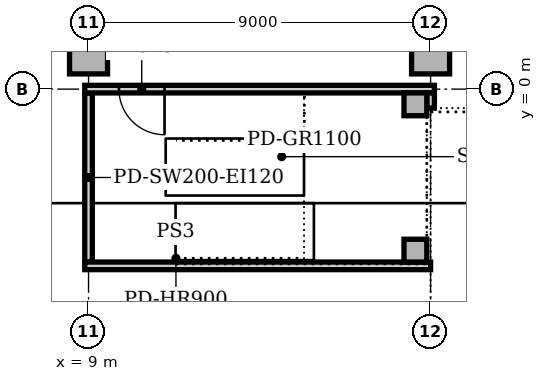
"""IFC4 building model, lengths in metres.
Left out: names, types, materials, properties, quantities, classifications, styles, units other than length and angle.
Written with IfcOpenShell. Run it as: python <this file> out.ifc"""

import sys

from ifc_helpers import new_model, si_unit, direction, frame, frame_2d, origin, origin_2d, place, context, subcontext, project, spatial, rectangle, extrude, element, fill, save


model = new_model("IFC4")
c1 = context("Model", 3, precision=1e-05, world=origin(), true_north=direction((0.0, 1.0)))
c2 = subcontext(c1, "Body", "Model", "MODEL_VIEW")
j1 = project(units=[si_unit("LENGTHUNIT", "METRE"), si_unit("PLANEANGLEUNIT", "RADIAN")], contexts=[c1])
p1 = place(None, origin())
s1 = spatial("IfcSite", under=j1, at=p1, CompositionType="ELEMENT")
p2 = place(p1, origin())
s2 = spatial("IfcBuilding", under=s1, at=p2, CompositionType="ELEMENT")
p3 = place(p2, frame((0.0, 0.0, -14.0)))
s3 = spatial("IfcBuildingStorey", under=s2, at=p3, CompositionType="ELEMENT", Elevation=-14.0)
for number, where, z_axis, x_axis in (
    (1, (9.0, 0.9, 0.0), (0.0, 0.0, 1.0), (1.0, 0.0, 0.0)),
    (2, (18.0, 0.9, 0.0), (0.0, 0.0, 1.0), (1.0, 0.0, 0.0)),
):
    element("IfcColumn", number, at=place(p3, frame(where, z_axis=z_axis, x_axis=x_axis)), inside=s3, PredefinedType="COLUMN", context=c2, shape_type="SweptSolid", body=[
        extrude(rectangle(XDim=1.0, YDim=1.0, at=origin_2d()), origin(), (0.0, 0.0, 1.0), 4.15),
    ])
for number, where, z_axis, x_axis in (
    (3, (17.6, -4.25, 0.0), (0.0, 0.0, 1.0), (1.0, 0.0, 0.0)),
    (4, (17.6, -0.4, 0.0), (0.0, 0.0, 1.0), (1.0, 0.0, 0.0)),
):
    element("IfcColumn", number, at=place(p3, frame(where, z_axis=z_axis, x_axis=x_axis)), inside=s3, PredefinedType="COLUMN", context=c2, shape_type="SweptSolid", body=[
        extrude(rectangle(XDim=0.6, YDim=0.6, at=origin_2d()), origin(), (0.0, 0.0, 1.0), 4.5),
    ])
p4 = place(p3, frame((9.0, -4.55, 0.0), z_axis=(0.0, 0.0, 1.0), x_axis=(0.0, 1.0, 0.0)))
e5 = element("IfcWall", 5, at=p4, inside=s3, PredefinedType="SOLIDWALL", context=c2, shape_type="SweptSolid", body=[
    extrude(rectangle(XDim=4.45, YDim=0.2, at=frame_2d((2.225, 0.0))), origin(), (0.0, 0.0, 1.0), 4.15),
])
p5 = place(p3, frame((8.9, 0.0, 0.0), z_axis=(0.0, 0.0, 1.0), x_axis=(1.0, 0.0, 0.0)))
e6 = element("IfcWall", 6, at=p5, inside=s3, PredefinedType="SOLIDWALL", context=c2, shape_type="SweptSolid", body=[
    extrude(rectangle(XDim=9.2, YDim=0.2, at=frame_2d((4.6, 0.0))), origin(), (0.0, 0.0, 1.0), 4.15),
])
p6 = place(p5, frame((0.9, 0.0, 0.0)))
e7 = element("IfcOpeningElement", 7, at=p6, cuts=e6, PredefinedType="OPENING", context=c2, shape_type="SweptSolid", body=[
    extrude(rectangle(XDim=1.2, YDim=2.1, at=frame_2d((0.6, 1.05))), frame((0.0, 0.11, 0.0), z_axis=(0.0, -1.0, 0.0), x_axis=(1.0, 0.0, 0.0)), (0.0, 0.0, 1.0), 0.22),
])
p7 = place(p3, frame((18.0, -0.5, 0.0), z_axis=(0.0, 0.0, 1.0), x_axis=(0.0, 1.0, 0.0)))
e8 = element("IfcWall", 8, at=p7, inside=s3, PredefinedType="SOLIDWALL", context=c2, shape_type="SweptSolid", body=[
    extrude(rectangle(XDim=0.4, YDim=0.2, at=frame_2d((0.2, 0.0))), origin(), (0.0, 0.0, 1.0), 4.15),
])
p8 = place(p3, frame((8.9, -4.65, 0.0), z_axis=(0.0, 0.0, 1.0), x_axis=(1.0, 0.0, 0.0)))
e9 = element("IfcWall", 9, at=p8, inside=s3, PredefinedType="SOLIDWALL", context=c2, shape_type="SweptSolid", body=[
    extrude(rectangle(XDim=9.1, YDim=0.2, at=frame_2d((4.55, 0.0))), origin(), (0.0, 0.0, 1.0), 4.15),
])
p9 = place(p6, frame((1.2, 0.0, 0.0), z_axis=(0.0, 0.0, 1.0), x_axis=(-1.0, 0.0, 0.0)))
e10 = element("IfcDoor", 10, at=p9, inside=s3, OperationType="SINGLE_SWING_LEFT", PredefinedType="DOOR", context=c2, shape_type="SweptSolid", body=[
    extrude(rectangle(XDim=1.2, YDim=2.1, at=frame_2d((0.6, 1.05))), frame((0.0, 0.025, 0.0), z_axis=(0.0, -1.0, 0.0), x_axis=(1.0, 0.0, 0.0)), (0.0, 0.0, 1.0), 0.05),
])
fill(e7, e10)
save(model, sys.argv[1])
